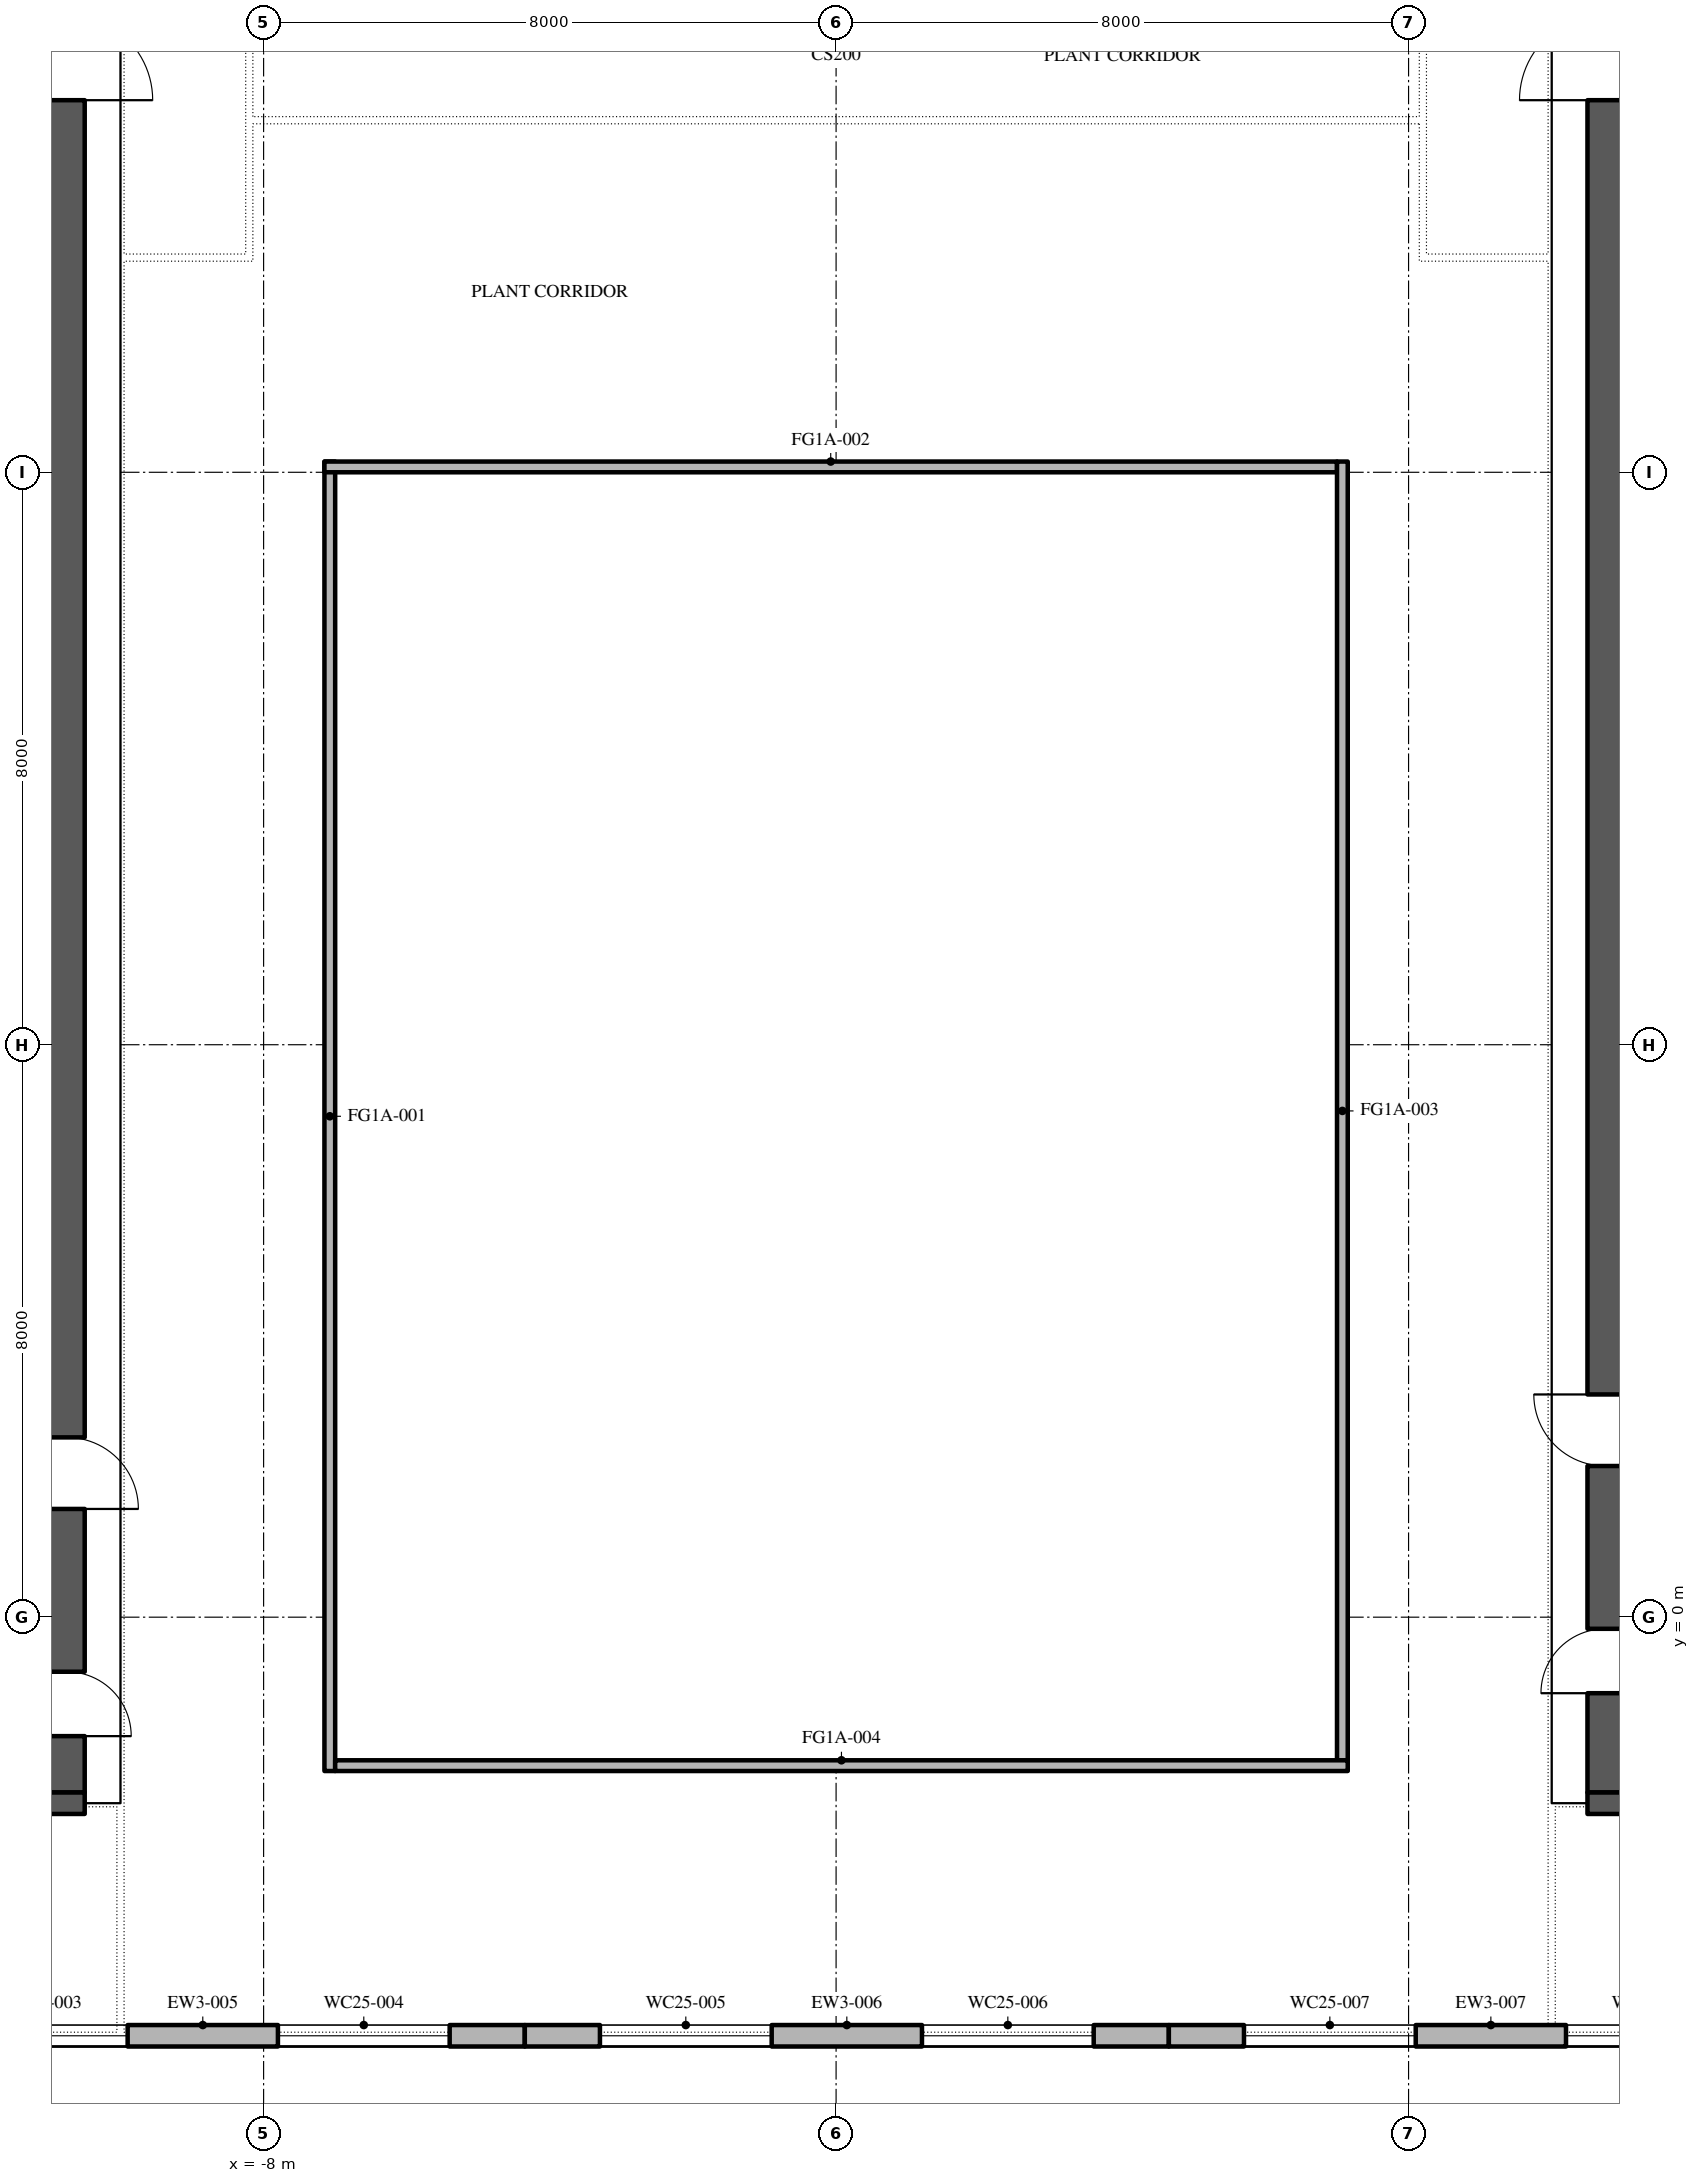
"""IFC4 building model, lengths in metres.
Left out: names, types, materials, properties, quantities, classifications, styles, units other than length and angle.
Written with IfcOpenShell. Run it as: python <this file> out.ifc"""

import sys

from ifc_helpers import new_model, si_unit, direction, frame, frame_2d, origin, place, context, subcontext, project, spatial, polyline, rectangle, outline, extrude, element, fill, save


model = new_model("IFC4")
c1 = context("Model", 3, precision=1e-05, world=origin(), true_north=direction((0.0, 1.0)))
c2 = subcontext(c1, "Body", "Model", "MODEL_VIEW")
j1 = project(units=[si_unit("LENGTHUNIT", "METRE"), si_unit("PLANEANGLEUNIT", "RADIAN")], contexts=[c1])
p1 = place(None, origin())
s1 = spatial("IfcSite", under=j1, at=p1, CompositionType="ELEMENT")
p2 = place(p1, origin())
s2 = spatial("IfcBuilding", under=s1, at=p2, CompositionType="ELEMENT")
p3 = place(p2, frame((0.0, 0.0, 377.4)))
s3 = spatial("IfcBuildingStorey", under=s2, at=p3, CompositionType="ELEMENT", Elevation=377.4)
p4 = place(p3, frame((-7.075, -2.15, 0.0), z_axis=(0.0, 0.0, 1.0), x_axis=(0.0, 1.0, 0.0)))
e1 = element("IfcWall", 1, at=p4, inside=s3, PredefinedType="STANDARD", context=c2, shape_type="SweptSolid", body=[
    extrude(rectangle(XDim=18.3, YDim=0.15, at=frame_2d((9.15, 0.0))), origin(), (0.0, 0.0, 1.0), 4.0),
])
p5 = place(p3, frame((-7.15, 16.075, 0.0), z_axis=(0.0, 0.0, 1.0), x_axis=(1.0, 0.0, 0.0)))
e2 = element("IfcWall", 2, at=p5, inside=s3, PredefinedType="STANDARD", context=c2, shape_type="SweptSolid", body=[
    extrude(rectangle(XDim=14.15, YDim=0.15, at=frame_2d((7.075, 0.0))), origin(), (0.0, 0.0, 1.0), 4.0),
])
p6 = place(p3, frame((7.075, 16.15, 0.0), z_axis=(0.0, 0.0, 1.0), x_axis=(0.0, -1.0, 0.0)))
e3 = element("IfcWall", 3, at=p6, inside=s3, PredefinedType="STANDARD", context=c2, shape_type="SweptSolid", body=[
    extrude(rectangle(XDim=18.15, YDim=0.15, at=frame_2d((9.075, 0.0))), origin(), (0.0, 0.0, 1.0), 4.0),
])
p7 = place(p3, frame((7.15, -2.075, 0.0), z_axis=(0.0, 0.0, 1.0), x_axis=(-1.0, 0.0, 0.0)))
e4 = element("IfcWall", 4, at=p7, inside=s3, PredefinedType="STANDARD", context=c2, shape_type="SweptSolid", body=[
    extrude(rectangle(XDim=14.15, YDim=0.15, at=frame_2d((7.075, 0.0))), origin(), (0.0, 0.0, 1.0), 4.0),
])
p8 = place(p3, frame((-13.35, -5.85, 0.0), z_axis=(0.0, 0.0, 1.0), x_axis=(1.0, 0.0, 0.0)))
e5 = element("IfcWall", 5, at=p8, inside=s3, PredefinedType="STANDARD", context=c2, shape_type="SweptSolid", body=[
    extrude(rectangle(XDim=9.0, YDim=0.3, at=frame_2d((4.5, 0.0))), origin(), (0.0, 0.0, 1.0), 4.0),
])
p9 = place(p8, frame((1.05, 0.0, 0.8)))
e6 = element("IfcOpeningElement", 6, at=p9, cuts=e5, PredefinedType="OPENING", context=c2, shape_type="SweptSolid", body=[
    extrude(outline(polyline([(0.0, 0.0), (2.4, 0.0), (2.4, 1.25), (2.377, 1.488), (2.31, 1.717), (2.2, 1.929), (2.051, 2.116), (1.87, 2.272), (1.663, 2.391), (1.437, 2.468), (1.2, 2.5), (0.963, 2.468), (0.737, 2.391), (0.53, 2.272), (0.349, 2.116), (0.2, 1.929), (0.09, 1.717), (0.023, 1.488), (0.0, 1.25), (0.0, 0.0)])), frame((0.0, 0.16, 0.0), z_axis=(0.0, -1.0, 0.0), x_axis=(1.0, 0.0, 0.0)), (0.0, 0.0, 1.0), 0.32),
])
p10 = place(p8, frame((5.55, 0.0, 0.8)))
e7 = element("IfcOpeningElement", 7, at=p10, cuts=e5, PredefinedType="OPENING", context=c2, shape_type="SweptSolid", body=[
    extrude(outline(polyline([(0.0, 0.0), (2.4, 0.0), (2.4, 1.25), (2.377, 1.488), (2.31, 1.717), (2.2, 1.929), (2.051, 2.116), (1.87, 2.272), (1.663, 2.391), (1.437, 2.468), (1.2, 2.5), (0.963, 2.468), (0.737, 2.391), (0.53, 2.272), (0.349, 2.116), (0.2, 1.929), (0.09, 1.717), (0.023, 1.488), (0.0, 1.25), (0.0, 0.0)])), frame((0.0, 0.16, 0.0), z_axis=(0.0, -1.0, 0.0), x_axis=(1.0, 0.0, 0.0)), (0.0, 0.0, 1.0), 0.32),
])
p11 = place(p3, frame((-4.35, -5.85, 0.0), z_axis=(0.0, 0.0, 1.0), x_axis=(1.0, 0.0, 0.0)))
e8 = element("IfcWall", 8, at=p11, inside=s3, PredefinedType="STANDARD", context=c2, shape_type="SweptSolid", body=[
    extrude(rectangle(XDim=9.0, YDim=0.3, at=frame_2d((4.5, 0.0))), origin(), (0.0, 0.0, 1.0), 4.0),
])
p12 = place(p11, frame((1.05, 0.0, 0.8)))
e9 = element("IfcOpeningElement", 9, at=p12, cuts=e8, PredefinedType="OPENING", context=c2, shape_type="SweptSolid", body=[
    extrude(outline(polyline([(0.0, 0.0), (2.4, 0.0), (2.4, 1.25), (2.377, 1.488), (2.31, 1.717), (2.2, 1.929), (2.051, 2.116), (1.87, 2.272), (1.663, 2.391), (1.437, 2.468), (1.2, 2.5), (0.963, 2.468), (0.737, 2.391), (0.53, 2.272), (0.349, 2.116), (0.2, 1.929), (0.09, 1.717), (0.023, 1.488), (0.0, 1.25), (0.0, 0.0)])), frame((0.0, 0.16, 0.0), z_axis=(0.0, -1.0, 0.0), x_axis=(1.0, 0.0, 0.0)), (0.0, 0.0, 1.0), 0.32),
])
p13 = place(p11, frame((5.55, 0.0, 0.8)))
e10 = element("IfcOpeningElement", 10, at=p13, cuts=e8, PredefinedType="OPENING", context=c2, shape_type="SweptSolid", body=[
    extrude(outline(polyline([(0.0, 0.0), (2.4, 0.0), (2.4, 1.25), (2.377, 1.488), (2.31, 1.717), (2.2, 1.929), (2.051, 2.116), (1.87, 2.272), (1.663, 2.391), (1.437, 2.468), (1.2, 2.5), (0.963, 2.468), (0.737, 2.391), (0.53, 2.272), (0.349, 2.116), (0.2, 1.929), (0.09, 1.717), (0.023, 1.488), (0.0, 1.25), (0.0, 0.0)])), frame((0.0, 0.16, 0.0), z_axis=(0.0, -1.0, 0.0), x_axis=(1.0, 0.0, 0.0)), (0.0, 0.0, 1.0), 0.32),
])
p14 = place(p3, frame((4.65, -5.85, 0.0), z_axis=(0.0, 0.0, 1.0), x_axis=(1.0, 0.0, 0.0)))
e11 = element("IfcWall", 11, at=p14, inside=s3, PredefinedType="STANDARD", context=c2, shape_type="SweptSolid", body=[
    extrude(rectangle(XDim=9.0, YDim=0.3, at=frame_2d((4.5, 0.0))), origin(), (0.0, 0.0, 1.0), 4.0),
])
p15 = place(p14, frame((1.05, 0.0, 0.8)))
e12 = element("IfcOpeningElement", 12, at=p15, cuts=e11, PredefinedType="OPENING", context=c2, shape_type="SweptSolid", body=[
    extrude(outline(polyline([(0.0, 0.0), (2.4, 0.0), (2.4, 1.25), (2.377, 1.488), (2.31, 1.717), (2.2, 1.929), (2.051, 2.116), (1.87, 2.272), (1.663, 2.391), (1.437, 2.468), (1.2, 2.5), (0.963, 2.468), (0.737, 2.391), (0.53, 2.272), (0.349, 2.116), (0.2, 1.929), (0.09, 1.717), (0.023, 1.488), (0.0, 1.25), (0.0, 0.0)])), frame((0.0, 0.16, 0.0), z_axis=(0.0, -1.0, 0.0), x_axis=(1.0, 0.0, 0.0)), (0.0, 0.0, 1.0), 0.32),
])
p16 = place(p14, frame((5.55, 0.0, 0.8)))
e13 = element("IfcOpeningElement", 13, at=p16, cuts=e11, PredefinedType="OPENING", context=c2, shape_type="SweptSolid", body=[
    extrude(outline(polyline([(0.0, 0.0), (2.4, 0.0), (2.4, 1.25), (2.377, 1.488), (2.31, 1.717), (2.2, 1.929), (2.051, 2.116), (1.87, 2.272), (1.663, 2.391), (1.437, 2.468), (1.2, 2.5), (0.963, 2.468), (0.737, 2.391), (0.53, 2.272), (0.349, 2.116), (0.2, 1.929), (0.09, 1.717), (0.023, 1.488), (0.0, 1.25), (0.0, 0.0)])), frame((0.0, 0.16, 0.0), z_axis=(0.0, -1.0, 0.0), x_axis=(1.0, 0.0, 0.0)), (0.0, 0.0, 1.0), 0.32),
])
p17 = place(p3, frame((-10.75, -2.45, 0.0), z_axis=(0.0, 0.0, 1.0), x_axis=(0.0, 1.0, 0.0)))
e14 = element("IfcWall", 14, at=p17, inside=s3, PredefinedType="SHEAR", context=c2, shape_type="SweptSolid", body=[
    extrude(rectangle(XDim=27.9, YDim=0.5, at=frame_2d((13.95, 0.0))), origin(), (0.0, 0.0, 1.0), 4.0),
])
p18 = place(p17, frame((23.65, 0.0, 0.0)))
e15 = element("IfcOpeningElement", 15, at=p18, cuts=e14, PredefinedType="OPENING", context=c2, shape_type="SweptSolid", body=[
    extrude(rectangle(XDim=2.4, YDim=2.1, at=frame_2d((1.2, 1.05))), frame((0.0, 0.26, 0.0), z_axis=(0.0, -1.0, 0.0), x_axis=(1.0, 0.0, 0.0)), (0.0, 0.0, 1.0), 0.52),
])
p19 = place(p17, frame((0.788, 0.0, 0.0)))
e16 = element("IfcOpeningElement", 16, at=p19, cuts=e14, PredefinedType="OPENING", context=c2, shape_type="SweptSolid", body=[
    extrude(rectangle(XDim=0.9, YDim=2.1, at=frame_2d((0.45, 1.05))), frame((0.0, 0.26, 0.0), z_axis=(0.0, -1.0, 0.0), x_axis=(1.0, 0.0, 0.0)), (0.0, 0.0, 1.0), 0.52),
])
p20 = place(p17, frame((3.962, 0.0, 0.0)))
e17 = element("IfcOpeningElement", 17, at=p20, cuts=e14, PredefinedType="OPENING", context=c2, shape_type="SweptSolid", body=[
    extrude(rectangle(XDim=1.0, YDim=2.1, at=frame_2d((0.5, 1.05))), frame((0.0, 0.26, 0.0), z_axis=(0.0, -1.0, 0.0), x_axis=(1.0, 0.0, 0.0)), (0.0, 0.0, 1.0), 0.52),
])
p21 = place(p3, frame((-21.5, -2.6, 0.0), z_axis=(0.0, 0.0, 1.0), x_axis=(1.0, 0.0, 0.0)))
e18 = element("IfcWall", 18, at=p21, inside=s3, PredefinedType="SHEAR", context=c2, shape_type="SweptSolid", body=[
    extrude(rectangle(XDim=11.0, YDim=0.3, at=frame_2d((5.5, 0.0))), origin(), (0.0, 0.0, 1.0), 4.0),
])
p22 = place(p3, frame((10.75, -2.45, 0.0), z_axis=(0.0, 0.0, 1.0), x_axis=(0.0, 1.0, 0.0)))
e19 = element("IfcWall", 19, at=p22, inside=s3, PredefinedType="SHEAR", context=c2, shape_type="SweptSolid", body=[
    extrude(rectangle(XDim=27.9, YDim=0.5, at=frame_2d((13.95, 0.0))), origin(), (0.0, 0.0, 1.0), 4.0),
])
p23 = place(p22, frame((23.65, 0.0, 0.0)))
e20 = element("IfcOpeningElement", 20, at=p23, cuts=e19, PredefinedType="OPENING", context=c2, shape_type="SweptSolid", body=[
    extrude(rectangle(XDim=2.4, YDim=2.1, at=frame_2d((1.2, 1.05))), frame((0.0, 0.26, 0.0), z_axis=(0.0, -1.0, 0.0), x_axis=(1.0, 0.0, 0.0)), (0.0, 0.0, 1.0), 0.52),
])
p24 = place(p22, frame((1.387, 0.0, 0.0)))
e21 = element("IfcOpeningElement", 21, at=p24, cuts=e19, PredefinedType="OPENING", context=c2, shape_type="SweptSolid", body=[
    extrude(rectangle(XDim=0.9, YDim=2.1, at=frame_2d((0.45, 1.05))), frame((0.0, 0.26, 0.0), z_axis=(0.0, -1.0, 0.0), x_axis=(1.0, 0.0, 0.0)), (0.0, 0.0, 1.0), 0.52),
])
p25 = place(p22, frame((4.562, 0.0, 0.0)))
e22 = element("IfcOpeningElement", 22, at=p25, cuts=e19, PredefinedType="OPENING", context=c2, shape_type="SweptSolid", body=[
    extrude(rectangle(XDim=1.0, YDim=2.1, at=frame_2d((0.5, 1.05))), frame((0.0, 0.26, 0.0), z_axis=(0.0, -1.0, 0.0), x_axis=(1.0, 0.0, 0.0)), (0.0, 0.0, 1.0), 0.52),
])
p26 = place(p3, frame((10.5, -2.6, 0.0), z_axis=(0.0, 0.0, 1.0), x_axis=(1.0, 0.0, 0.0)))
e23 = element("IfcWall", 23, at=p26, inside=s3, PredefinedType="SHEAR", context=c2, shape_type="SweptSolid", body=[
    extrude(rectangle(XDim=11.0, YDim=0.3, at=frame_2d((5.5, 0.0))), origin(), (0.0, 0.0, 1.0), 4.0),
])
p27 = place(p9, origin())
e24 = element("IfcWindow", 24, at=p27, inside=s3, PartitioningType="DOUBLE_PANEL_VERTICAL", PredefinedType="WINDOW", context=c2, shape_type="SweptSolid", body=[
    extrude(outline(polyline([(0.0, 0.0), (2.4, 0.0), (2.4, 1.25), (2.377, 1.488), (2.31, 1.717), (2.2, 1.929), (2.051, 2.116), (1.87, 2.272), (1.663, 2.391), (1.437, 2.468), (1.2, 2.5), (0.963, 2.468), (0.737, 2.391), (0.53, 2.272), (0.349, 2.116), (0.2, 1.929), (0.09, 1.717), (0.023, 1.488), (0.0, 1.25), (0.0, 0.0)])), frame((0.0, 0.03, 0.0), z_axis=(0.0, -1.0, 0.0), x_axis=(1.0, 0.0, 0.0)), (0.0, 0.0, 1.0), 0.06),
])
fill(e6, e24)
p28 = place(p10, origin())
e25 = element("IfcWindow", 25, at=p28, inside=s3, PartitioningType="DOUBLE_PANEL_VERTICAL", PredefinedType="WINDOW", context=c2, shape_type="SweptSolid", body=[
    extrude(outline(polyline([(0.0, 0.0), (2.4, 0.0), (2.4, 1.25), (2.377, 1.488), (2.31, 1.717), (2.2, 1.929), (2.051, 2.116), (1.87, 2.272), (1.663, 2.391), (1.437, 2.468), (1.2, 2.5), (0.963, 2.468), (0.737, 2.391), (0.53, 2.272), (0.349, 2.116), (0.2, 1.929), (0.09, 1.717), (0.023, 1.488), (0.0, 1.25), (0.0, 0.0)])), frame((0.0, 0.03, 0.0), z_axis=(0.0, -1.0, 0.0), x_axis=(1.0, 0.0, 0.0)), (0.0, 0.0, 1.0), 0.06),
])
fill(e7, e25)
p29 = place(p12, origin())
e26 = element("IfcWindow", 26, at=p29, inside=s3, PartitioningType="DOUBLE_PANEL_VERTICAL", PredefinedType="WINDOW", context=c2, shape_type="SweptSolid", body=[
    extrude(outline(polyline([(0.0, 0.0), (2.4, 0.0), (2.4, 1.25), (2.377, 1.488), (2.31, 1.717), (2.2, 1.929), (2.051, 2.116), (1.87, 2.272), (1.663, 2.391), (1.437, 2.468), (1.2, 2.5), (0.963, 2.468), (0.737, 2.391), (0.53, 2.272), (0.349, 2.116), (0.2, 1.929), (0.09, 1.717), (0.023, 1.488), (0.0, 1.25), (0.0, 0.0)])), frame((0.0, 0.03, 0.0), z_axis=(0.0, -1.0, 0.0), x_axis=(1.0, 0.0, 0.0)), (0.0, 0.0, 1.0), 0.06),
])
fill(e9, e26)
p30 = place(p13, origin())
e27 = element("IfcWindow", 27, at=p30, inside=s3, PartitioningType="DOUBLE_PANEL_VERTICAL", PredefinedType="WINDOW", context=c2, shape_type="SweptSolid", body=[
    extrude(outline(polyline([(0.0, 0.0), (2.4, 0.0), (2.4, 1.25), (2.377, 1.488), (2.31, 1.717), (2.2, 1.929), (2.051, 2.116), (1.87, 2.272), (1.663, 2.391), (1.437, 2.468), (1.2, 2.5), (0.963, 2.468), (0.737, 2.391), (0.53, 2.272), (0.349, 2.116), (0.2, 1.929), (0.09, 1.717), (0.023, 1.488), (0.0, 1.25), (0.0, 0.0)])), frame((0.0, 0.03, 0.0), z_axis=(0.0, -1.0, 0.0), x_axis=(1.0, 0.0, 0.0)), (0.0, 0.0, 1.0), 0.06),
])
fill(e10, e27)
p31 = place(p15, origin())
e28 = element("IfcWindow", 28, at=p31, inside=s3, PartitioningType="DOUBLE_PANEL_VERTICAL", PredefinedType="WINDOW", context=c2, shape_type="SweptSolid", body=[
    extrude(outline(polyline([(0.0, 0.0), (2.4, 0.0), (2.4, 1.25), (2.377, 1.488), (2.31, 1.717), (2.2, 1.929), (2.051, 2.116), (1.87, 2.272), (1.663, 2.391), (1.437, 2.468), (1.2, 2.5), (0.963, 2.468), (0.737, 2.391), (0.53, 2.272), (0.349, 2.116), (0.2, 1.929), (0.09, 1.717), (0.023, 1.488), (0.0, 1.25), (0.0, 0.0)])), frame((0.0, 0.03, 0.0), z_axis=(0.0, -1.0, 0.0), x_axis=(1.0, 0.0, 0.0)), (0.0, 0.0, 1.0), 0.06),
])
fill(e12, e28)
p32 = place(p16, origin())
e29 = element("IfcWindow", 29, at=p32, inside=s3, PartitioningType="DOUBLE_PANEL_VERTICAL", PredefinedType="WINDOW", context=c2, shape_type="SweptSolid", body=[
    extrude(outline(polyline([(0.0, 0.0), (2.4, 0.0), (2.4, 1.25), (2.377, 1.488), (2.31, 1.717), (2.2, 1.929), (2.051, 2.116), (1.87, 2.272), (1.663, 2.391), (1.437, 2.468), (1.2, 2.5), (0.963, 2.468), (0.737, 2.391), (0.53, 2.272), (0.349, 2.116), (0.2, 1.929), (0.09, 1.717), (0.023, 1.488), (0.0, 1.25), (0.0, 0.0)])), frame((0.0, 0.03, 0.0), z_axis=(0.0, -1.0, 0.0), x_axis=(1.0, 0.0, 0.0)), (0.0, 0.0, 1.0), 0.06),
])
fill(e13, e29)
p33 = place(p18, frame((2.4, 0.0, 0.0), z_axis=(0.0, 0.0, 1.0), x_axis=(-1.0, 0.0, 0.0)))
e30 = element("IfcDoor", 30, at=p33, inside=s3, OperationType="DOUBLE_DOOR_SINGLE_SWING", PredefinedType="DOOR", context=c2, shape_type="SweptSolid", body=[
    extrude(rectangle(XDim=2.4, YDim=2.1, at=frame_2d((1.2, 1.05))), frame((0.0, 0.025, 0.0), z_axis=(0.0, -1.0, 0.0), x_axis=(1.0, 0.0, 0.0)), (0.0, 0.0, 1.0), 0.05),
])
fill(e15, e30)
p34 = place(p23, origin())
e31 = element("IfcDoor", 31, at=p34, inside=s3, OperationType="DOUBLE_DOOR_SINGLE_SWING", PredefinedType="DOOR", context=c2, shape_type="SweptSolid", body=[
    extrude(rectangle(XDim=2.4, YDim=2.1, at=frame_2d((1.2, 1.05))), frame((0.0, 0.025, 0.0), z_axis=(0.0, -1.0, 0.0), x_axis=(1.0, 0.0, 0.0)), (0.0, 0.0, 1.0), 0.05),
])
fill(e20, e31)
save(model, sys.argv[1])
